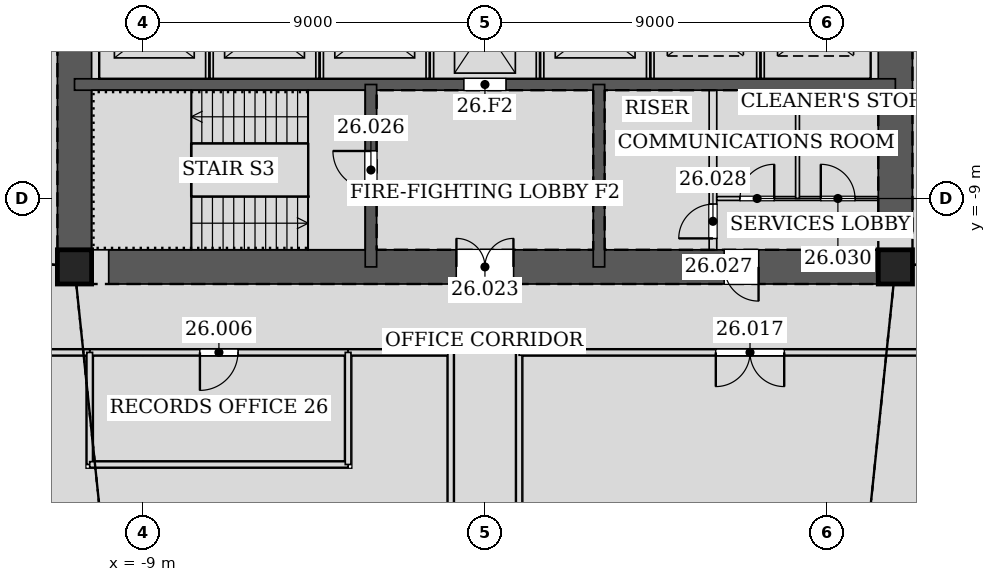
"""IFC4 building model, lengths in metres.
Left out: names, types, materials, properties, quantities, classifications, styles, units other than length and angle.
Written with IfcOpenShell. Run it as: python <this file> out.ifc"""

import sys

from ifc_helpers import new_model, si_unit, direction, frame, frame_2d, origin, origin_2d, place, context, subcontext, project, spatial, rectangle, hollow_rectangle, extrude, element, fill, save


model = new_model("IFC4")
c1 = context("Model", 3, precision=1e-05, world=origin(), true_north=direction((0.0, 1.0)))
c2 = subcontext(c1, "Body", "Model", "MODEL_VIEW")
j1 = project(units=[si_unit("LENGTHUNIT", "METRE"), si_unit("PLANEANGLEUNIT", "RADIAN")], contexts=[c1])
p1 = place(None, origin())
s1 = spatial("IfcSite", under=j1, at=p1, CompositionType="ELEMENT")
p2 = place(p1, origin())
s2 = spatial("IfcBuilding", under=s1, at=p2, CompositionType="ELEMENT")
p3 = place(p2, frame((0.0, 0.0, 117.6)))
s3 = spatial("IfcBuildingStorey", under=s2, at=p3, CompositionType="ELEMENT", Elevation=117.6)
for number, where, z_axis, x_axis in (
    (1, (-10.8, -10.8, 0.0), (0.0, 0.0, 1.0), (1.0, 0.0, 0.0)),
    (2, (10.8, -10.8, 0.0), (0.0, 0.0, 1.0), (1.0, 0.0, 0.0)),
):
    element("IfcColumn", number, at=place(p3, frame(where, z_axis=z_axis, x_axis=x_axis)), inside=s3, PredefinedType="COLUMN", context=c2, shape_type="SweptSolid", body=[
        extrude(hollow_rectangle(XDim=0.9, YDim=0.9, WallThickness=0.06, at=origin_2d()), origin(), (0.0, 0.0, 1.0), 4.2),
    ])
p4 = place(p3, frame((-10.8, -10.8, 0.0), z_axis=(0.0, 0.0, 1.0), x_axis=(1.0, 0.0, 0.0)))
e3 = element("IfcWall", 3, at=p4, inside=s3, PredefinedType="SOLIDWALL", context=c2, shape_type="SweptSolid", body=[
    extrude(rectangle(XDim=21.6, YDim=0.9, at=frame_2d((10.8, 0.0))), origin(), (0.0, 0.0, 1.0), 4.2),
])
p5 = place(p4, frame((10.05, 0.0, 0.0)))
e4 = element("IfcOpeningElement", 4, at=p5, cuts=e3, PredefinedType="OPENING", context=c2, shape_type="SweptSolid", body=[
    extrude(rectangle(XDim=1.5, YDim=2.1, at=frame_2d((0.75, 1.05))), frame((0.0, 0.46, 0.0), z_axis=(0.0, -1.0, 0.0), x_axis=(1.0, 0.0, 0.0)), (0.0, 0.0, 1.0), 0.92),
])
p6 = place(p4, frame((17.1, 0.0, 0.0)))
e5 = element("IfcOpeningElement", 5, at=p6, cuts=e3, PredefinedType="OPENING", context=c2, shape_type="SweptSolid", body=[
    extrude(rectangle(XDim=0.9, YDim=2.1, at=frame_2d((0.45, 1.05))), frame((0.0, 0.46, 0.0), z_axis=(0.0, -1.0, 0.0), x_axis=(1.0, 0.0, 0.0)), (0.0, 0.0, 1.0), 0.92),
])
p7 = place(p3, frame((10.8, -10.8, 0.0), z_axis=(0.0, 0.0, 1.0), x_axis=(0.0, 1.0, 0.0)))
e6 = element("IfcWall", 6, at=p7, inside=s3, PredefinedType="SOLIDWALL", context=c2, shape_type="SweptSolid", body=[
    extrude(rectangle(XDim=21.6, YDim=0.9, at=frame_2d((10.8, 0.0))), origin(), (0.0, 0.0, 1.0), 4.2),
])
p8 = place(p7, frame((11.7, 0.0, 0.0)))
e7 = element("IfcOpeningElement", 7, at=p8, cuts=e6, PredefinedType="OPENING", context=c2, shape_type="SweptSolid", body=[
    extrude(rectangle(XDim=1.2, YDim=2.1, at=frame_2d((0.6, 1.05))), frame((0.0, 0.46, 0.0), z_axis=(0.0, -1.0, 0.0), x_axis=(1.0, 0.0, 0.0)), (0.0, 0.0, 1.0), 0.92),
])
p9 = place(p7, frame((8.7, 0.0, 0.0)))
e8 = element("IfcOpeningElement", 8, at=p9, cuts=e6, PredefinedType="OPENING", context=c2, shape_type="SweptSolid", body=[
    extrude(rectangle(XDim=1.2, YDim=2.1, at=frame_2d((0.6, 1.05))), frame((0.0, 0.46, 0.0), z_axis=(0.0, -1.0, 0.0), x_axis=(1.0, 0.0, 0.0)), (0.0, 0.0, 1.0), 0.92),
])
p10 = place(p3, frame((-10.8, 10.8, 0.0), z_axis=(0.0, 0.0, 1.0), x_axis=(0.0, -1.0, 0.0)))
e9 = element("IfcWall", 9, at=p10, inside=s3, PredefinedType="SOLIDWALL", context=c2, shape_type="SweptSolid", body=[
    extrude(rectangle(XDim=21.6, YDim=0.9, at=frame_2d((10.8, 0.0))), origin(), (0.0, 0.0, 1.0), 4.2),
])
p11 = place(p10, frame((8.7, 0.0, 0.0)))
e10 = element("IfcOpeningElement", 10, at=p11, cuts=e9, PredefinedType="OPENING", context=c2, shape_type="SweptSolid", body=[
    extrude(rectangle(XDim=1.2, YDim=2.1, at=frame_2d((0.6, 1.05))), frame((0.0, 0.46, 0.0), z_axis=(0.0, -1.0, 0.0), x_axis=(1.0, 0.0, 0.0)), (0.0, 0.0, 1.0), 0.92),
])
p12 = place(p10, frame((11.7, 0.0, 0.0)))
e11 = element("IfcOpeningElement", 11, at=p12, cuts=e9, PredefinedType="OPENING", context=c2, shape_type="SweptSolid", body=[
    extrude(rectangle(XDim=1.2, YDim=2.1, at=frame_2d((0.6, 1.05))), frame((0.0, 0.46, 0.0), z_axis=(0.0, -1.0, 0.0), x_axis=(1.0, 0.0, 0.0)), (0.0, 0.0, 1.0), 0.92),
])
p13 = place(p3, frame((-10.8, -6.0, 0.0), z_axis=(0.0, 0.0, 1.0), x_axis=(1.0, 0.0, 0.0)))
e12 = element("IfcWall", 12, at=p13, inside=s3, PredefinedType="SOLIDWALL", context=c2, shape_type="SweptSolid", body=[
    extrude(rectangle(XDim=21.6, YDim=0.3, at=frame_2d((10.8, 0.0))), origin(), (0.0, 0.0, 1.0), 4.2),
])
p14 = place(p13, frame((10.25, 0.0, 0.0)))
e13 = element("IfcOpeningElement", 13, at=p14, cuts=e12, PredefinedType="OPENING", context=c2, shape_type="SweptSolid", body=[
    extrude(rectangle(XDim=1.1, YDim=2.1, at=frame_2d((0.55, 1.05))), frame((0.0, 0.16, 0.0), z_axis=(0.0, -1.0, 0.0), x_axis=(1.0, 0.0, 0.0)), (0.0, 0.0, 1.0), 0.32),
])
p15 = place(p3, frame((-3.0, -6.0, 0.0), z_axis=(0.0, 0.0, 1.0), x_axis=(0.0, -1.0, 0.0)))
e14 = element("IfcWall", 14, at=p15, inside=s3, PredefinedType="SOLIDWALL", context=c2, shape_type="SweptSolid", body=[
    extrude(rectangle(XDim=4.8, YDim=0.3, at=frame_2d((2.4, 0.0))), origin(), (0.0, 0.0, 1.0), 4.2),
])
p16 = place(p15, frame((1.75, 0.0, 0.0)))
e15 = element("IfcOpeningElement", 15, at=p16, cuts=e14, PredefinedType="OPENING", context=c2, shape_type="SweptSolid", body=[
    extrude(rectangle(XDim=1.0, YDim=2.1, at=frame_2d((0.5, 1.05))), frame((0.0, 0.16, 0.0), z_axis=(0.0, -1.0, 0.0), x_axis=(1.0, 0.0, 0.0)), (0.0, 0.0, 1.0), 0.32),
])
p17 = place(p3, frame((3.0, -6.0, 0.0), z_axis=(0.0, 0.0, 1.0), x_axis=(0.0, -1.0, 0.0)))
e16 = element("IfcWall", 16, at=p17, inside=s3, PredefinedType="SOLIDWALL", context=c2, shape_type="SweptSolid", body=[
    extrude(rectangle(XDim=4.8, YDim=0.3, at=frame_2d((2.4, 0.0))), origin(), (0.0, 0.0, 1.0), 4.2),
])
p18 = place(p3, frame((-10.401, -13.05, 0.0), z_axis=(0.0, 0.0, 1.0), x_axis=(1.0, 0.0, 0.0)))
e17 = element("IfcWall", 17, at=p18, inside=s3, PredefinedType="PARTITIONING", context=c2, shape_type="SweptSolid", body=[
    extrude(rectangle(XDim=6.802, YDim=0.15, at=frame_2d((3.401, 0.0))), origin(), (0.0, 0.0, 1.0), 3.098),
])
p19 = place(p18, frame((2.901, 0.0, 0.0)))
e18 = element("IfcOpeningElement", 18, at=p19, cuts=e17, PredefinedType="OPENING", context=c2, shape_type="SweptSolid", body=[
    extrude(rectangle(XDim=1.0, YDim=2.1, at=frame_2d((0.5, 1.05))), frame((0.0, 0.085, 0.0), z_axis=(0.0, -1.0, 0.0), x_axis=(1.0, 0.0, 0.0)), (0.0, 0.0, 1.0), 0.17),
])
p20 = place(p3, frame((-13.05, -13.05, 0.0), z_axis=(0.0, 0.0, 1.0), x_axis=(1.0, 0.0, 0.0)))
e19 = element("IfcWall", 19, at=p20, inside=s3, PredefinedType="PARTITIONING", context=c2, shape_type="SweptSolid", body=[
    extrude(rectangle(XDim=2.651, YDim=0.15, at=frame_2d((1.326, 0.0))), origin(), (0.0, 0.0, 1.0), 3.098),
])
p21 = place(p3, frame((-3.601, -13.05, 0.0), z_axis=(0.0, 0.0, 1.0), x_axis=(1.0, 0.0, 0.0)))
e20 = element("IfcWall", 20, at=p21, inside=s3, PredefinedType="PARTITIONING", context=c2, shape_type="SweptSolid", body=[
    extrude(rectangle(XDim=2.701, YDim=0.15, at=frame_2d((1.351, 0.0))), origin(), (0.0, 0.0, 1.0), 4.035),
])
for number, where, z_axis, x_axis in (
    (21, (-0.9, -13.05, 0.0), (0.0, 0.0, 1.0), (0.0, -1.0, 0.0)),
    (22, (0.9, -24.67, 0.0), (0.0, 0.0, 1.0), (0.0, 1.0, 0.0)),
):
    element("IfcWall", number, at=place(p3, frame(where, z_axis=z_axis, x_axis=x_axis)), inside=s3, PredefinedType="PARTITIONING", context=c2, shape_type="SweptSolid", body=[
        extrude(rectangle(XDim=11.62, YDim=0.15, at=frame_2d((5.81, 0.0))), origin(), (0.0, 0.0, 1.0), 3.426),
    ])
p22 = place(p3, frame((0.9, -13.05, 0.0), z_axis=(0.0, 0.0, 1.0), x_axis=(1.0, 0.0, 0.0)))
e23 = element("IfcWall", 23, at=p22, inside=s3, PredefinedType="PARTITIONING", context=c2, shape_type="SweptSolid", body=[
    extrude(rectangle(XDim=12.15, YDim=0.15, at=frame_2d((6.075, 0.0))), origin(), (0.0, 0.0, 1.0), 3.098),
])
p23 = place(p22, frame((5.175, 0.0, 0.0)))
e24 = element("IfcOpeningElement", 24, at=p23, cuts=e23, PredefinedType="OPENING", context=c2, shape_type="SweptSolid", body=[
    extrude(rectangle(XDim=1.8, YDim=2.4, at=frame_2d((0.9, 1.2))), frame((0.0, 0.085, 0.0), z_axis=(0.0, -1.0, 0.0), x_axis=(1.0, 0.0, 0.0)), (0.0, 0.0, 1.0), 0.17),
])
p24 = place(p3, frame((-10.4, -13.05, 0.0), z_axis=(0.0, 0.0, 1.0), x_axis=(0.0, -1.0, 0.0)))
e25 = element("IfcWall", 25, at=p24, inside=s3, PredefinedType="PARTITIONING", context=c2, shape_type="SweptSolid", body=[
    extrude(rectangle(XDim=2.95, YDim=0.15, at=frame_2d((1.475, 0.0))), origin(), (0.0, 0.0, 1.0), 3.098),
])
p25 = place(p3, frame((-10.4, -16.0, 0.0), z_axis=(0.0, 0.0, 1.0), x_axis=(1.0, 0.0, 0.0)))
e26 = element("IfcWall", 26, at=p25, inside=s3, PredefinedType="PARTITIONING", context=c2, shape_type="SweptSolid", body=[
    extrude(rectangle(XDim=6.8, YDim=0.15, at=frame_2d((3.4, 0.0))), origin(), (0.0, 0.0, 1.0), 3.098),
])
p26 = place(p3, frame((-3.6, -16.0, 0.0), z_axis=(0.0, 0.0, 1.0), x_axis=(0.0, 1.0, 0.0)))
e27 = element("IfcWall", 27, at=p26, inside=s3, PredefinedType="PARTITIONING", context=c2, shape_type="SweptSolid", body=[
    extrude(rectangle(XDim=2.95, YDim=0.15, at=frame_2d((1.475, 0.0))), origin(), (0.0, 0.0, 1.0), 3.426),
])
for number, where, z_axis, x_axis in (
    (28, (-7.25, -5.85, 0.0), (0.0, 0.0, 1.0), (0.0, 1.0, 0.0)),
    (29, (-4.35, -5.85, 0.0), (0.0, 0.0, 1.0), (0.0, 1.0, 0.0)),
    (30, (-1.45, -5.85, 0.0), (0.0, 0.0, 1.0), (0.0, 1.0, 0.0)),
    (31, (1.45, -5.85, 0.0), (0.0, 0.0, 1.0), (0.0, 1.0, 0.0)),
    (32, (4.35, -5.85, 0.0), (0.0, 0.0, 1.0), (0.0, 1.0, 0.0)),
    (33, (7.25, -5.85, 0.0), (0.0, 0.0, 1.0), (0.0, 1.0, 0.0)),
):
    element("IfcWall", number, at=place(p3, frame(where, z_axis=z_axis, x_axis=x_axis)), inside=s3, PredefinedType="PARTITIONING", context=c2, shape_type="SweptSolid", body=[
        extrude(rectangle(XDim=2.7, YDim=0.2, at=frame_2d((1.35, 0.0))), origin(), (0.0, 0.0, 1.0), 4.2),
    ])
p27 = place(p3, frame((6.0, -10.35, 0.0), z_axis=(0.0, 0.0, 1.0), x_axis=(0.0, 1.0, 0.0)))
e34 = element("IfcWall", 34, at=p27, inside=s3, PredefinedType="PARTITIONING", context=c2, shape_type="SweptSolid", body=[
    extrude(rectangle(XDim=4.2, YDim=0.2, at=frame_2d((2.1, 0.0))), origin(), (0.0, 0.0, 1.0), 4.035),
])
p28 = place(p27, frame((0.3, 0.0, 0.0)))
e35 = element("IfcOpeningElement", 35, at=p28, cuts=e34, PredefinedType="OPENING", context=c2, shape_type="SweptSolid", body=[
    extrude(rectangle(XDim=0.9, YDim=2.1, at=frame_2d((0.45, 1.05))), frame((0.0, 0.11, 0.0), z_axis=(0.0, -1.0, 0.0), x_axis=(1.0, 0.0, 0.0)), (0.0, 0.0, 1.0), 0.22),
])
p29 = place(p3, frame((6.1, -9.0, 0.0), z_axis=(0.0, 0.0, 1.0), x_axis=(1.0, 0.0, 0.0)))
e36 = element("IfcWall", 36, at=p29, inside=s3, PredefinedType="PARTITIONING", context=c2, shape_type="SweptSolid", body=[
    extrude(rectangle(XDim=4.25, YDim=0.1, at=frame_2d((2.125, 0.0))), origin(), (0.0, 0.0, 1.0), 4.035),
])
p30 = place(p29, frame((0.613, 0.0, 0.0)))
e37 = element("IfcOpeningElement", 37, at=p30, cuts=e36, PredefinedType="OPENING", context=c2, shape_type="SweptSolid", body=[
    extrude(rectangle(XDim=0.9, YDim=2.1, at=frame_2d((0.45, 1.05))), frame((0.0, 0.06, 0.0), z_axis=(0.0, -1.0, 0.0), x_axis=(1.0, 0.0, 0.0)), (0.0, 0.0, 1.0), 0.12),
])
p31 = place(p29, frame((2.738, 0.0, 0.0)))
e38 = element("IfcOpeningElement", 38, at=p31, cuts=e36, PredefinedType="OPENING", context=c2, shape_type="SweptSolid", body=[
    extrude(rectangle(XDim=0.9, YDim=2.1, at=frame_2d((0.45, 1.05))), frame((0.0, 0.06, 0.0), z_axis=(0.0, -1.0, 0.0), x_axis=(1.0, 0.0, 0.0)), (0.0, 0.0, 1.0), 0.12),
])
p32 = place(p3, frame((8.225, -9.0, 0.0), z_axis=(0.0, 0.0, 1.0), x_axis=(0.0, 1.0, 0.0)))
e39 = element("IfcWall", 39, at=p32, inside=s3, PredefinedType="PARTITIONING", context=c2, shape_type="SweptSolid", body=[
    extrude(rectangle(XDim=2.85, YDim=0.1, at=frame_2d((1.425, 0.0))), origin(), (0.0, 0.0, 1.0), 4.035),
])
p33 = place(p19, frame((1.0, 0.0, 0.0), z_axis=(0.0, 0.0, 1.0), x_axis=(-1.0, 0.0, 0.0)))
e40 = element("IfcDoor", 40, at=p33, inside=s3, OperationType="SINGLE_SWING_RIGHT", PredefinedType="DOOR", context=c2, shape_type="SweptSolid", body=[
    extrude(rectangle(XDim=1.0, YDim=2.1, at=frame_2d((0.5, 1.05))), frame((0.0, 0.025, 0.0), z_axis=(0.0, -1.0, 0.0), x_axis=(1.0, 0.0, 0.0)), (0.0, 0.0, 1.0), 0.05),
])
fill(e18, e40)
p34 = place(p23, frame((1.8, 0.0, 0.0), z_axis=(0.0, 0.0, 1.0), x_axis=(-1.0, 0.0, 0.0)))
e41 = element("IfcDoor", 41, at=p34, inside=s3, OperationType="DOUBLE_DOOR_SINGLE_SWING", PredefinedType="DOOR", context=c2, shape_type="SweptSolid", body=[
    extrude(rectangle(XDim=1.8, YDim=2.4, at=frame_2d((0.9, 1.2))), frame((0.0, 0.025, 0.0), z_axis=(0.0, -1.0, 0.0), x_axis=(1.0, 0.0, 0.0)), (0.0, 0.0, 1.0), 0.05),
])
fill(e24, e41)
p35 = place(p5, origin())
e42 = element("IfcDoor", 42, at=p35, inside=s3, OperationType="DOUBLE_DOOR_SINGLE_SWING", PredefinedType="DOOR", context=c2, shape_type="SweptSolid", body=[
    extrude(rectangle(XDim=1.5, YDim=2.1, at=frame_2d((0.75, 1.05))), frame((0.0, 0.025, 0.0), z_axis=(0.0, -1.0, 0.0), x_axis=(1.0, 0.0, 0.0)), (0.0, 0.0, 1.0), 0.05),
])
fill(e4, e42)
p36 = place(p16, frame((1.0, 0.0, 0.0), z_axis=(0.0, 0.0, 1.0), x_axis=(-1.0, 0.0, 0.0)))
e43 = element("IfcDoor", 43, at=p36, inside=s3, OperationType="SINGLE_SWING_RIGHT", PredefinedType="DOOR", context=c2, shape_type="SweptSolid", body=[
    extrude(rectangle(XDim=1.0, YDim=2.1, at=frame_2d((0.5, 1.05))), frame((0.0, 0.025, 0.0), z_axis=(0.0, -1.0, 0.0), x_axis=(1.0, 0.0, 0.0)), (0.0, 0.0, 1.0), 0.05),
])
fill(e15, e43)
p37 = place(p6, frame((0.9, 0.0, 0.0), z_axis=(0.0, 0.0, 1.0), x_axis=(-1.0, 0.0, 0.0)))
e44 = element("IfcDoor", 44, at=p37, inside=s3, OperationType="SINGLE_SWING_LEFT", PredefinedType="DOOR", context=c2, shape_type="SweptSolid", body=[
    extrude(rectangle(XDim=0.9, YDim=2.1, at=frame_2d((0.45, 1.05))), frame((0.0, 0.025, 0.0), z_axis=(0.0, -1.0, 0.0), x_axis=(1.0, 0.0, 0.0)), (0.0, 0.0, 1.0), 0.05),
])
fill(e5, e44)
p38 = place(p28, origin())
e45 = element("IfcDoor", 45, at=p38, inside=s3, OperationType="SINGLE_SWING_LEFT", PredefinedType="DOOR", context=c2, shape_type="SweptSolid", body=[
    extrude(rectangle(XDim=0.9, YDim=2.1, at=frame_2d((0.45, 1.05))), frame((0.0, 0.025, 0.0), z_axis=(0.0, -1.0, 0.0), x_axis=(1.0, 0.0, 0.0)), (0.0, 0.0, 1.0), 0.05),
])
fill(e35, e45)
p39 = place(p30, origin())
e46 = element("IfcDoor", 46, at=p39, inside=s3, OperationType="SINGLE_SWING_RIGHT", PredefinedType="DOOR", context=c2, shape_type="SweptSolid", body=[
    extrude(rectangle(XDim=0.9, YDim=2.1, at=frame_2d((0.45, 1.05))), frame((0.0, 0.025, 0.0), z_axis=(0.0, -1.0, 0.0), x_axis=(1.0, 0.0, 0.0)), (0.0, 0.0, 1.0), 0.05),
])
fill(e37, e46)
p40 = place(p31, origin())
e47 = element("IfcDoor", 47, at=p40, inside=s3, OperationType="SINGLE_SWING_LEFT", PredefinedType="DOOR", context=c2, shape_type="SweptSolid", body=[
    extrude(rectangle(XDim=0.9, YDim=2.1, at=frame_2d((0.45, 1.05))), frame((0.0, 0.025, 0.0), z_axis=(0.0, -1.0, 0.0), x_axis=(1.0, 0.0, 0.0)), (0.0, 0.0, 1.0), 0.05),
])
fill(e38, e47)
p41 = place(p14, origin())
e48 = element("IfcDoor", 48, at=p41, inside=s3, OperationType="DOUBLE_DOOR_SLIDING", PredefinedType="DOOR", context=c2, shape_type="SweptSolid", body=[
    extrude(rectangle(XDim=1.1, YDim=2.1, at=frame_2d((0.55, 1.05))), frame((0.0, 0.025, 0.0), z_axis=(0.0, -1.0, 0.0), x_axis=(1.0, 0.0, 0.0)), (0.0, 0.0, 1.0), 0.05),
])
fill(e13, e48)
save(model, sys.argv[1])
